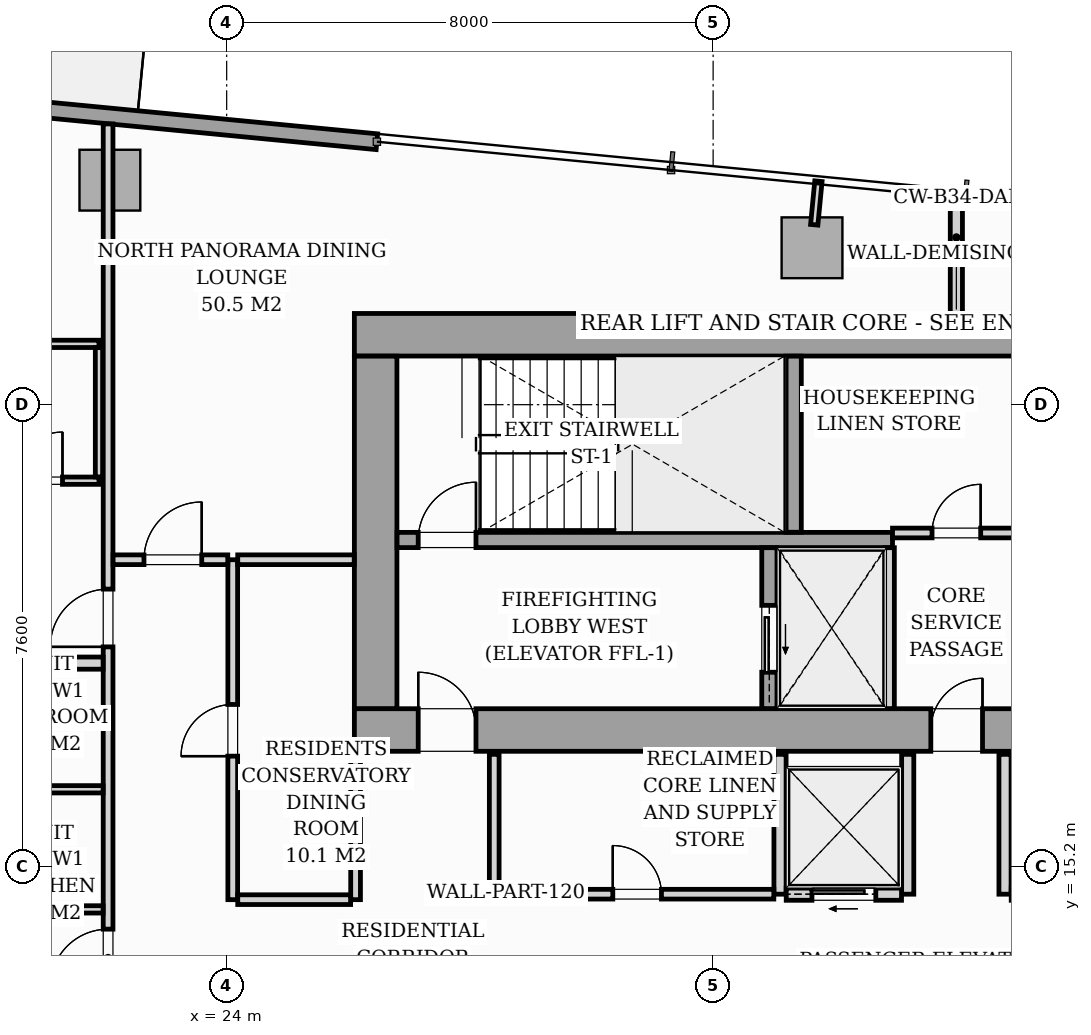
"""IFC4 building model, lengths in metres.
Left out: names, types, materials, properties, quantities, classifications, styles, units other than length and angle.
Written with IfcOpenShell. Run it as: python <this file> out.ifc"""

import sys

from ifc_helpers import new_model, si_unit, direction, frame, frame_2d, origin, origin_2d, place, context, subcontext, project, spatial, rectangle, i_section, extrude, source, transform, mapped, element, fill, save


model = new_model("IFC4")
c1 = context("Model", 3, precision=1e-05, world=origin(), true_north=direction((0.0, 1.0)))
c2 = subcontext(c1, "Body", "Model", "MODEL_VIEW")
j1 = project(units=[si_unit("LENGTHUNIT", "METRE"), si_unit("PLANEANGLEUNIT", "RADIAN")], contexts=[c1])
p1 = place(None, origin())
s1 = spatial("IfcSite", under=j1, at=p1, CompositionType="ELEMENT")
p2 = place(p1, origin())
s2 = spatial("IfcBuilding", under=s1, at=p2, CompositionType="ELEMENT")
p3 = place(p2, frame((0.0, 0.0, 159.8)))
s3 = spatial("IfcBuildingStorey", under=s2, at=p3, CompositionType="ELEMENT", Elevation=159.8)
m1 = source(origin(), c2, "Body", "SweptSolid", [
    extrude(i_section(OverallWidth=0.421, OverallDepth=0.465, WebThickness=0.045, FlangeThickness=0.073, FilletRadius=0.018, at=origin_2d()), origin(), (0.0, 0.0, 1.0), 3.196),
])
for number, where, z_axis, x_axis in (
    (1, (26.4, 17.4, 0.002), (0.0, 0.0, 1.0), (1.0, 0.0, 0.0)),
    (2, (33.12, 17.4, 0.002), (0.0, 0.0, 1.0), (1.0, 0.0, 0.0)),
    (3, (26.4, 24.0, 0.002), (0.0, 0.0, 1.0), (1.0, 0.0, 0.0)),
    (4, (33.12, 24.0, 0.002), (0.0, 0.0, 1.0), (1.0, 0.0, 0.0)),
):
    element("IfcColumn", number, at=place(p3, frame(where, z_axis=z_axis, x_axis=x_axis)), inside=s3, PredefinedType="PILASTER", context=c2, shape_type="MappedRepresentation", body=[
        mapped(m1, transform((0.0, 0.0, 0.0), scale=1.0)),
    ])
m2 = source(origin(), c2, "Body", "SweptSolid", [
    extrude(rectangle(XDim=1.0, YDim=1.0, at=origin_2d()), origin(), (0.0, 0.0, 1.0), 3.194),
])
for number, where, z_axis, x_axis in (
    (5, (22.08, 26.492, 0.002), (0.0, 0.0, 1.0), (0.995, -0.096, 0.0)),
    (6, (33.626, 25.38, 0.002), (0.0, 0.0, 1.0), (0.995, -0.096, 0.0)),
):
    element("IfcColumn", number, at=place(p3, frame(where, z_axis=z_axis, x_axis=x_axis)), inside=s3, PredefinedType="COLUMN", context=c2, shape_type="MappedRepresentation", body=[
        mapped(m2, transform((0.0, 0.0, 0.0), scale=1.0)),
    ])
p4 = place(p3, frame((9.539, 28.754, 0.0), z_axis=(0.0, 0.0, 1.0), x_axis=(0.995397345886, -0.09583383433, 0.0)))
e7 = element("IfcWall", 7, at=p4, inside=s3, PredefinedType="STANDARD", context=c2, shape_type="SweptSolid", body=[
    extrude(rectangle(XDim=17.01, YDim=0.26, at=frame_2d((8.505, 0.0))), origin(), (0.0, 0.0, 1.0), 2.9),
])
p5 = place(p4, frame((6.424, 0.0, 0.0)))
e8 = element("IfcOpeningElement", 8, at=p5, cuts=e7, PredefinedType="OPENING", context=c2, shape_type="SweptSolid", body=[
    extrude(rectangle(XDim=1.8, YDim=2.06, at=frame_2d((0.9, 1.03))), frame((0.0, 0.14, 0.0), z_axis=(0.0, -1.0, 0.0), x_axis=(1.0, 0.0, 0.0)), (0.0, 0.0, 1.0), 0.28),
])
p6 = place(p4, frame((2.05, 0.0, 0.65)))
e9 = element("IfcOpeningElement", 9, at=p6, cuts=e7, PredefinedType="OPENING", context=c2, shape_type="SweptSolid", body=[
    extrude(rectangle(XDim=1.6, YDim=1.5, at=frame_2d((0.8, 0.75))), frame((0.0, 0.14, 0.0), z_axis=(0.0, -1.0, 0.0), x_axis=(1.0, 0.0, 0.0)), (0.0, 0.0, 1.0), 0.28),
])
p7 = place(p3, frame((26.1, 17.45, 0.0), z_axis=(0.0, 0.0, 1.0), x_axis=(1.0, 0.0, 0.0)))
e10 = element("IfcWall", 10, at=p7, inside=s3, PredefinedType="SHEAR", context=c2, shape_type="SweptSolid", body=[
    extrude(rectangle(XDim=19.8, YDim=0.7, at=frame_2d((9.9, 0.0))), origin(), (0.0, 0.0, 1.0), 3.2),
])
p8 = place(p7, frame((1.05, 0.0, 0.0)))
e11 = element("IfcOpeningElement", 11, at=p8, cuts=e10, PredefinedType="OPENING", context=c2, shape_type="SweptSolid", body=[
    extrude(rectangle(XDim=0.95, YDim=2.06, at=frame_2d((0.475, 1.03))), frame((0.0, 0.36, 0.0), z_axis=(0.0, -1.0, 0.0), x_axis=(1.0, 0.0, 0.0)), (0.0, 0.0, 1.0), 0.72),
])
p9 = place(p7, frame((9.48, 0.0, 0.0)))
e12 = element("IfcOpeningElement", 12, at=p9, cuts=e10, PredefinedType="OPENING", context=c2, shape_type="SweptSolid", body=[
    extrude(rectangle(XDim=0.85, YDim=2.0, at=frame_2d((0.425, 1.0))), frame((0.0, 0.36, 0.0), z_axis=(0.0, -1.0, 0.0), x_axis=(1.0, 0.0, 0.0)), (0.0, 0.0, 1.0), 0.72),
])
p10 = place(p7, frame((17.65, 0.0, 0.0)))
e13 = element("IfcOpeningElement", 13, at=p10, cuts=e10, PredefinedType="OPENING", context=c2, shape_type="SweptSolid", body=[
    extrude(rectangle(XDim=0.95, YDim=2.06, at=frame_2d((0.475, 1.03))), frame((0.0, 0.36, 0.0), z_axis=(0.0, -1.0, 0.0), x_axis=(1.0, 0.0, 0.0)), (0.0, 0.0, 1.0), 0.72),
])
p11 = place(p3, frame((26.1, 23.95, 0.0), z_axis=(0.0, 0.0, 1.0), x_axis=(1.0, 0.0, 0.0)))
e14 = element("IfcWall", 14, at=p11, inside=s3, PredefinedType="SHEAR", context=c2, shape_type="SweptSolid", body=[
    extrude(rectangle(XDim=19.8, YDim=0.7, at=frame_2d((9.9, 0.0))), origin(), (0.0, 0.0, 1.0), 3.2),
])
p12 = place(p3, frame((26.45, 17.802, 0.0), z_axis=(0.0, 0.0, 1.0), x_axis=(0.0, 1.0, 0.0)))
e15 = element("IfcWall", 15, at=p12, inside=s3, PredefinedType="SHEAR", context=c2, shape_type="SweptSolid", body=[
    extrude(rectangle(XDim=5.796, YDim=0.7, at=frame_2d((2.898, 0.0))), origin(), (0.0, 0.0, 1.0), 3.2),
])
p13 = place(p3, frame((26.802, 20.575, 0.0), z_axis=(0.0, 0.0, 1.0), x_axis=(1.0, 0.0, 0.0)))
e16 = element("IfcWall", 16, at=p13, inside=s3, PredefinedType="SOLIDWALL", context=c2, shape_type="SweptSolid", body=[
    extrude(rectangle(XDim=8.148, YDim=0.25, at=frame_2d((4.074, 0.0))), origin(), (0.0, 0.0, 1.0), 3.2),
])
p14 = place(p13, frame((0.348, 0.0, 0.0)))
e17 = element("IfcOpeningElement", 17, at=p14, cuts=e16, PredefinedType="OPENING", context=c2, shape_type="SweptSolid", body=[
    extrude(rectangle(XDim=0.95, YDim=2.06, at=frame_2d((0.475, 1.03))), frame((0.0, 0.135, 0.0), z_axis=(0.0, -1.0, 0.0), x_axis=(1.0, 0.0, 0.0)), (0.0, 0.0, 1.0), 0.27),
])
p15 = place(p3, frame((33.325, 20.702, 0.0), z_axis=(0.0, 0.0, 1.0), x_axis=(0.0, 1.0, 0.0)))
e18 = element("IfcWall", 18, at=p15, inside=s3, PredefinedType="SOLIDWALL", context=c2, shape_type="SweptSolid", body=[
    extrude(rectangle(XDim=2.896, YDim=0.25, at=frame_2d((1.448, 0.0))), origin(), (0.0, 0.0, 1.0), 3.2),
])
p16 = place(p3, frame((32.925, 17.802, 0.0), z_axis=(0.0, 0.0, 1.0), x_axis=(0.0, 1.0, 0.0)))
e19 = element("IfcWall", 19, at=p16, inside=s3, PredefinedType="SOLIDWALL", context=c2, shape_type="SweptSolid", body=[
    extrude(rectangle(XDim=2.646, YDim=0.25, at=frame_2d((1.323, 0.0))), origin(), (0.0, 0.0, 1.0), 3.2),
])
p17 = place(p16, frame((0.598, 0.0, 0.0)))
e20 = element("IfcOpeningElement", 20, at=p17, cuts=e19, PredefinedType="OPENING", context=c2, shape_type="SweptSolid", body=[
    extrude(rectangle(XDim=1.1, YDim=2.08, at=frame_2d((0.55, 1.04))), frame((0.0, 0.135, 0.0), z_axis=(0.0, -1.0, 0.0), x_axis=(1.0, 0.0, 0.0)), (0.0, 0.0, 1.0), 0.27),
])
p18 = place(p3, frame((34.9, 17.802, 0.0), z_axis=(0.0, 0.0, 1.0), x_axis=(0.0, 1.0, 0.0)))
e21 = element("IfcWall", 21, at=p18, inside=s3, PredefinedType="PARTITIONING", context=c2, shape_type="SweptSolid", body=[
    extrude(rectangle(XDim=2.646, YDim=0.16, at=frame_2d((1.323, 0.0))), origin(), (0.0, 0.0, 1.0), 2.9),
])
p19 = place(p3, frame((34.95, 20.69, 0.0), z_axis=(0.0, 0.0, 1.0), x_axis=(1.0, 0.0, 0.0)))
e22 = element("IfcWall", 22, at=p19, inside=s3, PredefinedType="PARTITIONING", context=c2, shape_type="SweptSolid", body=[
    extrude(rectangle(XDim=2.1, YDim=0.16, at=frame_2d((1.05, 0.0))), origin(), (0.0, 0.0, 1.0), 2.9),
])
p20 = place(p19, frame((0.65, 0.0, 0.0)))
e23 = element("IfcOpeningElement", 23, at=p20, cuts=e22, PredefinedType="OPENING", context=c2, shape_type="SweptSolid", body=[
    extrude(rectangle(XDim=0.8, YDim=2.05, at=frame_2d((0.4, 1.025))), frame((0.0, 0.09, 0.0), z_axis=(0.0, -1.0, 0.0), x_axis=(1.0, 0.0, 0.0)), (0.0, 0.0, 1.0), 0.18),
])
p21 = place(p3, frame((28.4, 14.75, 0.0), z_axis=(0.0, 0.0, 1.0), x_axis=(0.0, 1.0, 0.0)))
e24 = element("IfcWall", 24, at=p21, inside=s3, PredefinedType="PARTITIONING", context=c2, shape_type="SweptSolid", body=[
    extrude(rectangle(XDim=2.3, YDim=0.16, at=frame_2d((1.15, 0.0))), origin(), (0.0, 0.0, 1.0), 2.9),
])
p22 = place(p3, frame((33.1, 14.75, 0.0), z_axis=(0.0, 0.0, 1.0), x_axis=(0.0, 1.0, 0.0)))
e25 = element("IfcWall", 25, at=p22, inside=s3, PredefinedType="PARTITIONING", context=c2, shape_type="SweptSolid", body=[
    extrude(rectangle(XDim=2.3, YDim=0.2, at=frame_2d((1.15, 0.0))), origin(), (0.0, 0.0, 1.0), 2.9),
])
p23 = place(p3, frame((28.482, 14.75, 0.0), z_axis=(0.0, 0.0, 1.0), x_axis=(1.0, 0.0, 0.0)))
e26 = element("IfcWall", 26, at=p23, inside=s3, PredefinedType="PARTITIONING", context=c2, shape_type="SweptSolid", body=[
    extrude(rectangle(XDim=4.516, YDim=0.16, at=frame_2d((2.258, 0.0))), origin(), (0.0, 0.0, 1.0), 2.9),
])
p24 = place(p23, frame((1.868, 0.0, 0.0)))
e27 = element("IfcOpeningElement", 27, at=p24, cuts=e26, PredefinedType="OPENING", context=c2, shape_type="SweptSolid", body=[
    extrude(rectangle(XDim=0.8, YDim=2.05, at=frame_2d((0.4, 1.025))), frame((0.0, 0.09, 0.0), z_axis=(0.0, -1.0, 0.0), x_axis=(1.0, 0.0, 0.0)), (0.0, 0.0, 1.0), 0.18),
])
p25 = place(p3, frame((35.2, 14.75, 0.0), z_axis=(0.0, 0.0, 1.0), x_axis=(0.0, 1.0, 0.0)))
e28 = element("IfcWall", 28, at=p25, inside=s3, PredefinedType="PARTITIONING", context=c2, shape_type="SweptSolid", body=[
    extrude(rectangle(XDim=2.3, YDim=0.2, at=frame_2d((1.15, 0.0))), origin(), (0.0, 0.0, 1.0), 2.9),
])
p26 = place(p3, frame((33.202, 14.75, 0.0), z_axis=(0.0, 0.0, 1.0), x_axis=(1.0, 0.0, 0.0)))
e29 = element("IfcWall", 29, at=p26, inside=s3, PredefinedType="PARTITIONING", context=c2, shape_type="SweptSolid", body=[
    extrude(rectangle(XDim=1.896, YDim=0.2, at=frame_2d((0.948, 0.0))), origin(), (0.0, 0.0, 1.0), 2.9),
])
p27 = place(p26, frame((0.423, 0.0, 0.0)))
e30 = element("IfcOpeningElement", 30, at=p27, cuts=e29, PredefinedType="OPENING", context=c2, shape_type="SweptSolid", body=[
    extrude(rectangle(XDim=1.05, YDim=2.08, at=frame_2d((0.525, 1.04))), frame((0.0, 0.11, 0.0), z_axis=(0.0, -1.0, 0.0), x_axis=(1.0, 0.0, 0.0)), (0.0, 0.0, 1.0), 0.22),
])
p28 = place(p3, frame((36.8, 14.75, 0.0), z_axis=(0.0, 0.0, 1.0), x_axis=(0.0, 1.0, 0.0)))
e31 = element("IfcWall", 31, at=p28, inside=s3, PredefinedType="PARTITIONING", context=c2, shape_type="SweptSolid", body=[
    extrude(rectangle(XDim=2.3, YDim=0.2, at=frame_2d((1.15, 0.0))), origin(), (0.0, 0.0, 1.0), 2.9),
])
p29 = place(p3, frame((22.05, 12.732, 0.0), z_axis=(0.0, 0.0, 1.0), x_axis=(0.0, 1.0, 0.0)))
e32 = element("IfcWall", 32, at=p29, inside=s3, PredefinedType="PARTITIONING", context=c2, shape_type="SweptSolid", body=[
    extrude(rectangle(XDim=14.685, YDim=0.16, at=frame_2d((7.343, 0.0))), origin(), (0.0, 0.0, 1.0), 2.9),
])
p30 = place(p29, frame((0.493, 0.0, 0.0)))
e33 = element("IfcOpeningElement", 33, at=p30, cuts=e32, PredefinedType="OPENING", context=c2, shape_type="SweptSolid", body=[
    extrude(rectangle(XDim=0.95, YDim=2.06, at=frame_2d((0.475, 1.03))), frame((0.0, 0.09, 0.0), z_axis=(0.0, -1.0, 0.0), x_axis=(1.0, 0.0, 0.0)), (0.0, 0.0, 1.0), 0.18),
])
p31 = place(p29, frame((6.085, 0.0, 0.0)))
e34 = element("IfcOpeningElement", 34, at=p31, cuts=e32, PredefinedType="OPENING", context=c2, shape_type="SweptSolid", body=[
    extrude(rectangle(XDim=0.95, YDim=2.06, at=frame_2d((0.475, 1.03))), frame((0.0, 0.09, 0.0), z_axis=(0.0, -1.0, 0.0), x_axis=(1.0, 0.0, 0.0)), (0.0, 0.0, 1.0), 0.18),
])
p32 = place(p3, frame((36.0, 24.302, 0.0), z_axis=(0.0, 0.0, 1.0), x_axis=(0.0, 1.0, 0.0)))
e35 = element("IfcWall", 35, at=p32, inside=s3, PredefinedType="PARTITIONING", context=c2, shape_type="SweptSolid", body=[
    extrude(rectangle(XDim=1.955, YDim=0.2, at=frame_2d((0.978, 0.0))), origin(), (0.0, 0.0, 1.0), 2.9),
])
p33 = place(p3, frame((6.125, 18.55, 0.0), z_axis=(0.0, 0.0, 1.0), x_axis=(1.0, 0.0, 0.0)))
e36 = element("IfcWall", 36, at=p33, inside=s3, PredefinedType="PARTITIONING", context=c2, shape_type="SweptSolid", body=[
    extrude(rectangle(XDim=15.843, YDim=0.2, at=frame_2d((7.921, 0.0))), origin(), (0.0, 0.0, 1.0), 2.023),
])
for number, where, z_axis, x_axis in (
    (37, (19.712, 16.475, 0.0), (0.0, 0.0, 1.0), (1.0, 0.0, 0.0)),
    (38, (19.712, 14.5, 0.0), (0.0, 0.0, 1.0), (1.0, 0.0, 0.0)),
):
    element("IfcWall", number, at=place(p3, frame(where, z_axis=z_axis, x_axis=x_axis)), inside=s3, PredefinedType="PARTITIONING", context=c2, shape_type="SweptSolid", body=[
        extrude(rectangle(XDim=2.256, YDim=0.12, at=frame_2d((1.128, 0.0))), origin(), (0.0, 0.0, 1.0), 2.9),
    ])
p34 = place(p3, frame((17.7, 21.55, 0.0), z_axis=(0.0, 0.0, 1.0), x_axis=(1.0, 0.0, 0.0)))
e39 = element("IfcWall", 39, at=p34, inside=s3, PredefinedType="PARTITIONING", context=c2, shape_type="SweptSolid", body=[
    extrude(rectangle(XDim=4.2, YDim=0.12, at=frame_2d((2.1, 0.0))), origin(), (0.0, 0.0, 1.0), 2.9),
])
p35 = place(p34, frame((0.675, 0.0, 0.0)))
e40 = element("IfcOpeningElement", 40, at=p35, cuts=e39, PredefinedType="OPENING", context=c2, shape_type="SweptSolid", body=[
    extrude(rectangle(XDim=0.85, YDim=2.05, at=frame_2d((0.425, 1.025))), frame((0.0, 0.07, 0.0), z_axis=(0.0, -1.0, 0.0), x_axis=(1.0, 0.0, 0.0)), (0.0, 0.0, 1.0), 0.14),
])
p36 = place(p34, frame((2.8, 0.0, 0.0)))
e41 = element("IfcOpeningElement", 41, at=p36, cuts=e39, PredefinedType="OPENING", context=c2, shape_type="SweptSolid", body=[
    extrude(rectangle(XDim=0.8, YDim=2.0, at=frame_2d((0.4, 1.0))), frame((0.0, 0.07, 0.0), z_axis=(0.0, -1.0, 0.0), x_axis=(1.0, 0.0, 0.0)), (0.0, 0.0, 1.0), 0.14),
])
p37 = place(p3, frame((17.7, 23.8, 0.0), z_axis=(0.0, 0.0, 1.0), x_axis=(1.0, 0.0, 0.0)))
e42 = element("IfcWall", 42, at=p37, inside=s3, PredefinedType="PARTITIONING", context=c2, shape_type="SweptSolid", body=[
    extrude(rectangle(XDim=4.2, YDim=0.12, at=frame_2d((2.1, 0.0))), origin(), (0.0, 0.0, 1.0), 2.9),
])
p38 = place(p3, frame((21.9, 21.612, 0.0), z_axis=(0.0, 0.0, 1.0), x_axis=(0.0, 1.0, 0.0)))
e43 = element("IfcWall", 43, at=p38, inside=s3, PredefinedType="PARTITIONING", context=c2, shape_type="SweptSolid", body=[
    extrude(rectangle(XDim=2.126, YDim=0.12, at=frame_2d((1.063, 0.0))), origin(), (0.0, 0.0, 1.0), 2.9),
])
p39 = place(p3, frame((24.1, 14.66, 0.0), z_axis=(0.0, 0.0, 1.0), x_axis=(0.0, 1.0, 0.0)))
e44 = element("IfcWall", 44, at=p39, inside=s3, PredefinedType="PARTITIONING", context=c2, shape_type="SweptSolid", body=[
    extrude(rectangle(XDim=5.59, YDim=0.16, at=frame_2d((2.795, 0.0))), origin(), (0.0, 0.0, 1.0), 2.9),
])
p40 = place(p39, frame((2.36, 0.0, 0.0)))
e45 = element("IfcOpeningElement", 45, at=p40, cuts=e44, PredefinedType="OPENING", context=c2, shape_type="SweptSolid", body=[
    extrude(rectangle(XDim=0.85, YDim=2.0, at=frame_2d((0.425, 1.0))), frame((0.0, 0.09, 0.0), z_axis=(0.0, -1.0, 0.0), x_axis=(1.0, 0.0, 0.0)), (0.0, 0.0, 1.0), 0.18),
])
p41 = place(p3, frame((22.132, 20.25, 0.0), z_axis=(0.0, 0.0, 1.0), x_axis=(1.0, 0.0, 0.0)))
e46 = element("IfcWall", 46, at=p41, inside=s3, PredefinedType="PARTITIONING", context=c2, shape_type="SweptSolid", body=[
    extrude(rectangle(XDim=1.886, YDim=0.16, at=frame_2d((0.943, 0.0))), origin(), (0.0, 0.0, 1.0), 2.9),
])
p42 = place(p41, frame((0.508, 0.0, 0.0)))
e47 = element("IfcOpeningElement", 47, at=p42, cuts=e46, PredefinedType="OPENING", context=c2, shape_type="SweptSolid", body=[
    extrude(rectangle(XDim=0.95, YDim=2.06, at=frame_2d((0.475, 1.03))), frame((0.0, 0.09, 0.0), z_axis=(0.0, -1.0, 0.0), x_axis=(1.0, 0.0, 0.0)), (0.0, 0.0, 1.0), 0.18),
])
p43 = place(p3, frame((24.182, 20.25, 0.0), z_axis=(0.0, 0.0, 1.0), x_axis=(1.0, 0.0, 0.0)))
e48 = element("IfcWall", 48, at=p43, inside=s3, PredefinedType="PARTITIONING", context=c2, shape_type="SweptSolid", body=[
    extrude(rectangle(XDim=1.916, YDim=0.16, at=frame_2d((0.958, 0.0))), origin(), (0.0, 0.0, 1.0), 2.9),
])
p44 = place(p3, frame((26.12, 14.66, 0.0), z_axis=(0.0, 0.0, 1.0), x_axis=(0.0, 1.0, 0.0)))
e49 = element("IfcWall", 49, at=p44, inside=s3, PredefinedType="PARTITIONING", context=c2, shape_type="SweptSolid", body=[
    extrude(rectangle(XDim=2.438, YDim=0.16, at=frame_2d((1.219, 0.0))), origin(), (0.0, 0.0, 1.0), 2.9),
])
p45 = place(p3, frame((24.182, 14.66, 0.0), z_axis=(0.0, 0.0, 1.0), x_axis=(1.0, 0.0, 0.0)))
e50 = element("IfcWall", 50, at=p45, inside=s3, PredefinedType="PARTITIONING", context=c2, shape_type="SweptSolid", body=[
    extrude(rectangle(XDim=1.856, YDim=0.16, at=frame_2d((0.928, 0.0))), origin(), (0.0, 0.0, 1.0), 2.9),
])
p46 = place(p3, frame((33.663, 25.759, 0.0), z_axis=(0.0, 0.0, 1.0), x_axis=(0.095977354523, 0.995383517755, 0.0)))
e51 = element("IfcWall", 51, at=p46, inside=s3, PredefinedType="PARTITIONING", context=c2, shape_type="SweptSolid", body=[
    extrude(rectangle(XDim=0.72, YDim=0.12, at=frame_2d((0.36, 0.0))), origin(), (0.0, 0.0, 1.0), 2.9),
])
m3 = source(origin(), c2, "Body", "SweptSolid", [
    extrude(rectangle(XDim=0.95, YDim=2.06, at=frame_2d((0.475, 1.03))), frame((0.0, 0.025, 0.0), z_axis=(0.0, -1.0, 0.0), x_axis=(1.0, 0.0, 0.0)), (0.0, 0.0, 1.0), 0.05),
])
p47 = place(p8, origin())
e52 = element("IfcDoor", 52, at=p47, inside=s3, OperationType="SINGLE_SWING_LEFT", PredefinedType="DOOR", context=c2, shape_type="MappedRepresentation", body=[
    mapped(m3, transform((0.0, 0.0, 0.0), scale=1.0)),
])
fill(e11, e52)
m4 = source(origin(), c2, "Body", "SweptSolid", [
    extrude(rectangle(XDim=0.85, YDim=2.0, at=frame_2d((0.425, 1.0))), frame((0.0, 0.025, 0.0), z_axis=(0.0, -1.0, 0.0), x_axis=(1.0, 0.0, 0.0)), (0.0, 0.0, 1.0), 0.05),
])
p48 = place(p9, origin())
e53 = element("IfcDoor", 53, at=p48, inside=s3, OperationType="SINGLE_SWING_RIGHT", PredefinedType="DOOR", context=c2, shape_type="MappedRepresentation", body=[
    mapped(m4, transform((0.0, 0.0, 0.0), scale=1.0)),
])
fill(e12, e53)
p49 = place(p14, origin())
e54 = element("IfcDoor", 54, at=p49, inside=s3, OperationType="SINGLE_SWING_RIGHT", PredefinedType="DOOR", context=c2, shape_type="MappedRepresentation", body=[
    mapped(m3, transform((0.0, 0.0, 0.0), scale=1.0)),
])
fill(e17, e54)
m5 = source(origin(), c2, "Body", "SweptSolid", [
    extrude(rectangle(XDim=1.1, YDim=2.08, at=frame_2d((0.55, 1.04))), frame((0.0, 0.025, 0.0), z_axis=(0.0, -1.0, 0.0), x_axis=(1.0, 0.0, 0.0)), (0.0, 0.0, 1.0), 0.05),
])
p50 = place(p17, origin())
e55 = element("IfcDoor", 55, at=p50, inside=s3, OperationType="SLIDING_TO_LEFT", PredefinedType="DOOR", context=c2, shape_type="MappedRepresentation", body=[
    mapped(m5, transform((0.0, 0.0, 0.0), scale=1.0)),
])
fill(e20, e55)
m6 = source(origin(), c2, "Body", "SweptSolid", [
    extrude(rectangle(XDim=0.8, YDim=2.05, at=frame_2d((0.4, 1.025))), frame((0.0, 0.025, 0.0), z_axis=(0.0, -1.0, 0.0), x_axis=(1.0, 0.0, 0.0)), (0.0, 0.0, 1.0), 0.05),
])
p51 = place(p20, origin())
e56 = element("IfcDoor", 56, at=p51, inside=s3, OperationType="SINGLE_SWING_RIGHT", PredefinedType="DOOR", context=c2, shape_type="MappedRepresentation", body=[
    mapped(m6, transform((0.0, 0.0, 0.0), scale=1.0)),
])
fill(e23, e56)
p52 = place(p24, origin())
e57 = element("IfcDoor", 57, at=p52, inside=s3, OperationType="SINGLE_SWING_LEFT", PredefinedType="DOOR", context=c2, shape_type="MappedRepresentation", body=[
    mapped(m6, transform((0.0, 0.0, 0.0), scale=1.0)),
])
fill(e27, e57)
m7 = source(origin(), c2, "Body", "SweptSolid", [
    extrude(rectangle(XDim=1.05, YDim=2.08, at=frame_2d((0.525, 1.04))), frame((0.0, 0.025, 0.0), z_axis=(0.0, -1.0, 0.0), x_axis=(1.0, 0.0, 0.0)), (0.0, 0.0, 1.0), 0.05),
])
p53 = place(p27, origin())
e58 = element("IfcDoor", 58, at=p53, inside=s3, OperationType="SLIDING_TO_LEFT", PredefinedType="DOOR", context=c2, shape_type="MappedRepresentation", body=[
    mapped(m7, transform((0.0, 0.0, 0.0), scale=1.0)),
])
fill(e30, e58)
m8 = source(origin(), c2, "Body", "SweptSolid", [
    extrude(rectangle(XDim=0.95, YDim=2.06, at=frame_2d((0.475, 1.03))), frame((0.0, 0.025, 0.0), z_axis=(0.0, -1.0, 0.0), x_axis=(1.0, 0.0, 0.0)), (0.0, 0.0, 1.0), 0.05),
])
p54 = place(p30, origin())
e59 = element("IfcDoor", 59, at=p54, inside=s3, OperationType="SINGLE_SWING_LEFT", PredefinedType="DOOR", context=c2, shape_type="MappedRepresentation", body=[
    mapped(m8, transform((0.0, 0.0, 0.0), scale=1.0)),
])
fill(e33, e59)
p55 = place(p31, origin())
e60 = element("IfcDoor", 60, at=p55, inside=s3, OperationType="SINGLE_SWING_LEFT", PredefinedType="DOOR", context=c2, shape_type="MappedRepresentation", body=[
    mapped(m8, transform((0.0, 0.0, 0.0), scale=1.0)),
])
fill(e34, e60)
m9 = source(origin(), c2, "Body", "SweptSolid", [
    extrude(rectangle(XDim=0.8, YDim=2.0, at=frame_2d((0.4, 1.0))), frame((0.0, 0.025, 0.0), z_axis=(0.0, -1.0, 0.0), x_axis=(1.0, 0.0, 0.0)), (0.0, 0.0, 1.0), 0.05),
])
p56 = place(p36, origin())
e61 = element("IfcDoor", 61, at=p56, inside=s3, OperationType="SINGLE_SWING_RIGHT", PredefinedType="DOOR", context=c2, shape_type="MappedRepresentation", body=[
    mapped(m9, transform((0.0, 0.0, 0.0), scale=1.0)),
])
fill(e41, e61)
p57 = place(p40, origin())
e62 = element("IfcDoor", 62, at=p57, inside=s3, OperationType="SINGLE_SWING_LEFT", PredefinedType="DOOR", context=c2, shape_type="MappedRepresentation", body=[
    mapped(m4, transform((0.0, 0.0, 0.0), scale=1.0)),
])
fill(e45, e62)
p58 = place(p42, origin())
e63 = element("IfcDoor", 63, at=p58, inside=s3, OperationType="SINGLE_SWING_RIGHT", PredefinedType="DOOR", context=c2, shape_type="MappedRepresentation", body=[
    mapped(m8, transform((0.0, 0.0, 0.0), scale=1.0)),
])
fill(e47, e63)
save(model, sys.argv[1])
